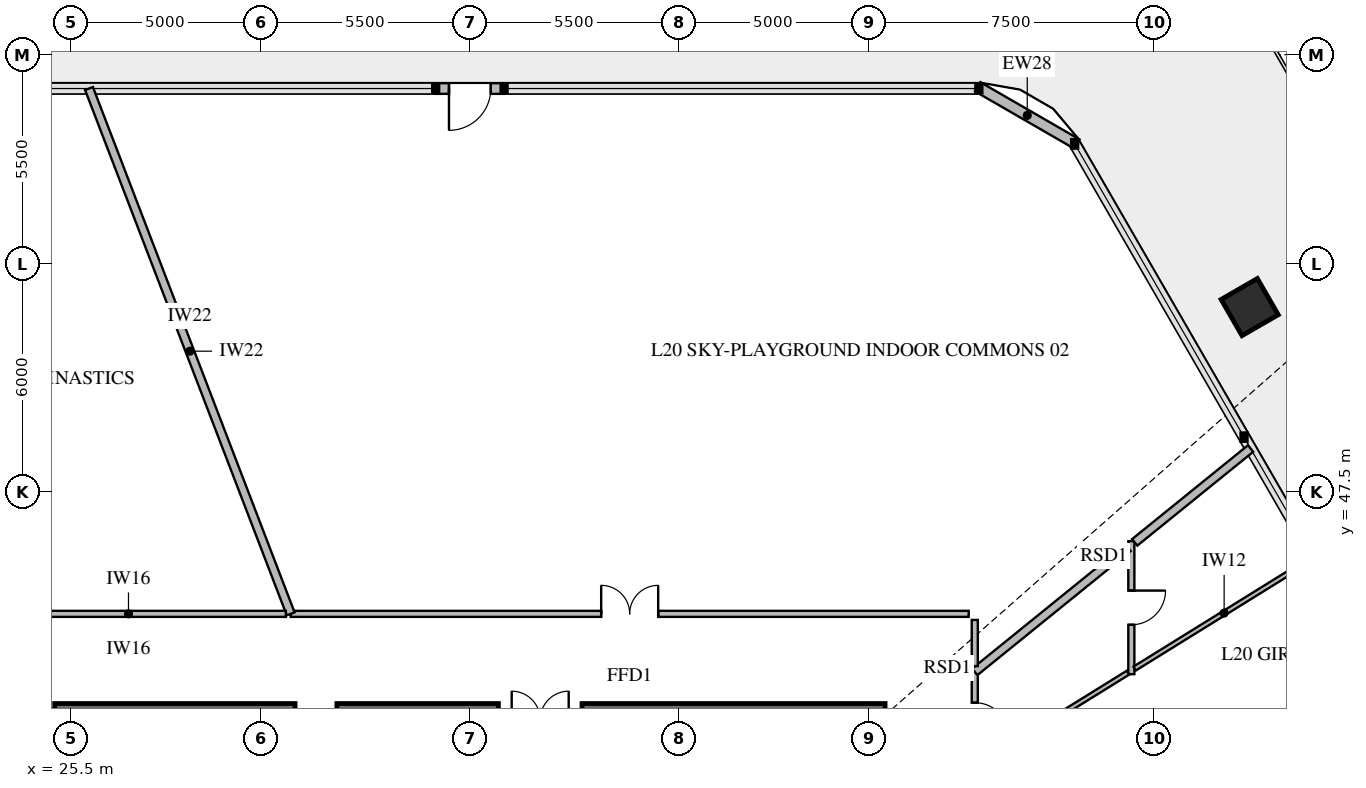
"""IFC4 building model, lengths in metres.
Left out: names, types, materials, properties, quantities, classifications, styles, units other than length and angle.
Written with IfcOpenShell. Run it as: python <this file> out.ifc"""

import sys

from ifc_helpers import new_model, si_unit, direction, frame, frame_2d, origin, origin_2d, place, context, subcontext, project, spatial, rectangle, extrude, element, fill, save


model = new_model("IFC4")
c1 = context("Model", 3, precision=1e-05, world=origin(), true_north=direction((0.0, 1.0)))
c2 = subcontext(c1, "Body", "Model", "MODEL_VIEW")
j1 = project(units=[si_unit("LENGTHUNIT", "METRE"), si_unit("PLANEANGLEUNIT", "RADIAN")], contexts=[c1])
p1 = place(None, origin())
s1 = spatial("IfcSite", under=j1, at=p1, CompositionType="ELEMENT")
p2 = place(p1, origin())
s2 = spatial("IfcBuilding", under=s1, at=p2, CompositionType="ELEMENT")
p3 = place(p2, frame((0.0, 0.0, 83.4)))
s3 = spatial("IfcBuildingStorey", under=s2, at=p3, CompositionType="ELEMENT", Elevation=83.4)
p4 = place(p3, frame((46.925, 41.5, 0.0), z_axis=(0.0, 0.0, 1.0), x_axis=(-1.0, 0.0, 0.0)))
e1 = element("IfcWall", 1, at=p4, inside=s3, PredefinedType="SHEAR", context=c2, shape_type="SweptSolid", body=[
    extrude(rectangle(XDim=7.975, YDim=0.85, at=frame_2d((3.988, 0.0))), origin(), (0.0, 0.0, 1.0), 4.2),
])
p5 = place(p3, frame((36.75, 41.5, 0.0), z_axis=(0.0, 0.0, 1.0), x_axis=(-1.0, 0.0, 0.0)))
e2 = element("IfcWall", 2, at=p5, inside=s3, PredefinedType="SHEAR", context=c2, shape_type="SweptSolid", body=[
    extrude(rectangle(XDim=11.675, YDim=0.85, at=frame_2d((5.837, 0.0))), origin(), (0.0, 0.0, 1.0), 4.2),
])
p6 = place(p5, frame((4.25, 0.0, 0.0)))
e3 = element("IfcOpeningElement", 3, at=p6, cuts=e2, PredefinedType="OPENING", context=c2, shape_type="SweptSolid", body=[
    extrude(rectangle(XDim=1.1, YDim=2.15, at=frame_2d((0.55, 1.075))), frame((0.0, 0.437, 0.0), z_axis=(0.0, -1.0, 0.0), x_axis=(1.0, 0.0, 0.0)), (0.0, 0.0, 1.0), 0.874),
])
p7 = place(p3, frame((56.519, 52.357, 0.0), z_axis=(0.0, 0.0, 1.0), x_axis=(-0.5, 0.866025403784, 0.0)))
e4 = element("IfcColumn", 4, at=p7, inside=s3, PredefinedType="COLUMN", context=c2, shape_type="SweptSolid", body=[
    extrude(rectangle(XDim=1.1, YDim=1.1, at=origin_2d()), origin(), (0.0, 0.0, 1.0), 3.85),
])
p8 = place(p3, frame((35.105, 58.108, 0.0), z_axis=(0.0, 0.0, 1.0), x_axis=(1.0, 0.0, 0.0)))
e5 = element("IfcWall", 5, at=p8, inside=s3, PredefinedType="SOLIDWALL", context=c2, shape_type="SweptSolid", body=[
    extrude(rectangle(XDim=1.79, YDim=0.28, at=frame_2d((0.895, 0.0))), origin(), (0.0, 0.0, 1.0), 3.85),
])
p9 = place(p8, frame((0.345, 0.0, 0.0)))
e6 = element("IfcOpeningElement", 6, at=p9, cuts=e5, PredefinedType="OPENING", context=c2, shape_type="SweptSolid", body=[
    extrude(rectangle(XDim=1.1, YDim=2.2, at=frame_2d((0.55, 1.1))), frame((0.0, 0.152, 0.0), z_axis=(0.0, -1.0, 0.0), x_axis=(1.0, 0.0, 0.0)), (0.0, 0.0, 1.0), 0.304),
])
p10 = place(p3, frame((49.36, 58.156, 0.0), z_axis=(0.0, 0.0, 1.0), x_axis=(0.866017028182, -0.500014506688, 0.0)))
e7 = element("IfcWall", 7, at=p10, inside=s3, PredefinedType="SOLIDWALL", context=c2, shape_type="SweptSolid", body=[
    extrude(rectangle(XDim=3.015, YDim=0.28, at=frame_2d((1.508, 0.0))), origin(), (0.0, 0.0, 1.0), 3.85),
])
p11 = place(p3, frame((53.405, 46.197, 0.0), z_axis=(0.0, 0.0, 1.0), x_axis=(0.0, -1.0, 0.0)))
e8 = element("IfcWall", 8, at=p11, inside=s3, PredefinedType="PARTITIONING", context=c2, shape_type="SweptSolid", body=[
    extrude(rectangle(XDim=3.5, YDim=0.16, at=frame_2d((1.75, 0.0))), origin(), (0.0, 0.0, 1.0), 3.4),
])
p12 = place(p11, frame((1.3, 0.0, 0.0)))
e9 = element("IfcOpeningElement", 9, at=p12, cuts=e8, PredefinedType="OPENING", context=c2, shape_type="SweptSolid", body=[
    extrude(rectangle(XDim=0.9, YDim=2.1, at=frame_2d((0.45, 1.05))), frame((0.0, 0.092, 0.0), z_axis=(0.0, -1.0, 0.0), x_axis=(1.0, 0.0, 0.0)), (0.0, 0.0, 1.0), 0.184),
])
p13 = place(p3, frame((49.285, 40.237, 0.0), z_axis=(0.0, 0.0, 1.0), x_axis=(0.0, 1.0, 0.0)))
e10 = element("IfcWall", 10, at=p13, inside=s3, PredefinedType="PARTITIONING", context=c2, shape_type="SweptSolid", body=[
    extrude(rectangle(XDim=2.521, YDim=0.16, at=frame_2d((1.26, 0.0))), origin(), (0.0, 0.0, 1.0), 3.85),
])
p14 = place(p13, frame((0.811, 0.0, 0.0)))
e11 = element("IfcOpeningElement", 11, at=p14, cuts=e10, PredefinedType="OPENING", context=c2, shape_type="SweptSolid", body=[
    extrude(rectangle(XDim=0.9, YDim=2.1, at=frame_2d((0.45, 1.05))), frame((0.0, 0.092, 0.0), z_axis=(0.0, -1.0, 0.0), x_axis=(1.0, 0.0, 0.0)), (0.0, 0.0, 1.0), 0.184),
])
p15 = place(p3, frame((49.125, 44.285, 0.0), z_axis=(0.0, 0.0, 1.0), x_axis=(-1.0, 0.0, 0.0)))
e12 = element("IfcWall", 12, at=p15, inside=s3, PredefinedType="PARTITIONING", context=c2, shape_type="SweptSolid", body=[
    extrude(rectangle(XDim=17.841, YDim=0.16, at=frame_2d((8.92, 0.0))), origin(), (0.0, 0.0, 1.0), 3.15),
])
p16 = place(p15, frame((8.17, 0.0, 0.0)))
e13 = element("IfcOpeningElement", 13, at=p16, cuts=e12, PredefinedType="OPENING", context=c2, shape_type="SweptSolid", body=[
    extrude(rectangle(XDim=1.5, YDim=2.15, at=frame_2d((0.75, 1.075))), frame((0.0, 0.092, 0.0), z_axis=(0.0, -1.0, 0.0), x_axis=(1.0, 0.0, 0.0)), (0.0, 0.0, 1.0), 0.184),
])
p17 = place(p3, frame((49.373, 37.787, 0.0), z_axis=(0.0, 0.0, 1.0), x_axis=(0.917761357583, 0.397132333772, 0.0)))
e14 = element("IfcWall", 14, at=p17, inside=s3, PredefinedType="PARTITIONING", context=c2, shape_type="SweptSolid", body=[
    extrude(rectangle(XDim=11.711, YDim=0.12, at=frame_2d((5.855, 0.0))), origin(), (0.0, 0.0, 1.0), 3.4),
])
p18 = place(p3, frame((49.373, 40.292, 0.0), z_axis=(0.0, 0.0, 1.0), x_axis=(0.849866876435, 0.526997431054, 0.0)))
e15 = element("IfcWall", 15, at=p18, inside=s3, PredefinedType="PARTITIONING", context=c2, shape_type="SweptSolid", body=[
    extrude(rectangle(XDim=4.641, YDim=0.12, at=frame_2d((2.32, 0.0))), origin(), (0.0, 0.0, 1.0), 3.85),
])
p19 = place(p3, frame((53.493, 42.846, 0.0), z_axis=(0.0, 0.0, 1.0), x_axis=(0.849887293627, 0.526964503673, 0.0)))
e16 = element("IfcWall", 16, at=p19, inside=s3, PredefinedType="PARTITIONING", context=c2, shape_type="SweptSolid", body=[
    extrude(rectangle(XDim=5.539, YDim=0.12, at=frame_2d((2.77, 0.0))), origin(), (0.0, 0.0, 1.0), 3.4),
])
p20 = place(p3, frame((49.285, 42.758, 0.0), z_axis=(0.0, 0.0, 1.0), x_axis=(0.777159385962, 0.629303812805, 0.0)))
e17 = element("IfcWall", 17, at=p20, inside=s3, PredefinedType="PARTITIONING", context=c2, shape_type="SweptSolid", body=[
    extrude(rectangle(XDim=5.188, YDim=0.22, at=frame_2d((2.594, 0.0))), origin(), (0.0, 0.0, 1.0), 3.4),
])
p21 = place(p3, frame((53.493, 46.166, 0.0), z_axis=(0.0, 0.0, 1.0), x_axis=(0.77713476339, 0.62933421926, 0.0)))
e18 = element("IfcWall", 18, at=p21, inside=s3, PredefinedType="PARTITIONING", context=c2, shape_type="SweptSolid", body=[
    extrude(rectangle(XDim=3.925, YDim=0.22, at=frame_2d((1.962, 0.0))), origin(), (0.0, 0.0, 1.0), 3.85),
])
p22 = place(p3, frame((49.285, 42.91, 0.0), z_axis=(0.0, 0.0, 1.0), x_axis=(0.0, 1.0, 0.0)))
e19 = element("IfcWall", 19, at=p22, inside=s3, PredefinedType="PARTITIONING", context=c2, shape_type="SweptSolid", body=[
    extrude(rectangle(XDim=1.215, YDim=0.16, at=frame_2d((0.607, 0.0))), origin(), (0.0, 0.0, 1.0), 3.85),
])
p23 = place(p3, frame((31.284, 44.285, 0.0), z_axis=(0.0, 0.0, 1.0), x_axis=(-0.358376835574, 0.933577015422, 0.0)))
e20 = element("IfcWall", 20, at=p23, inside=s3, PredefinedType="PARTITIONING", context=c2, shape_type="SweptSolid", body=[
    extrude(rectangle(XDim=14.807, YDim=0.22, at=frame_2d((7.403, 0.0))), origin(), (0.0, 0.0, 1.0), 3.4),
])
p24 = place(p3, frame((31.158, 44.285, 0.0), z_axis=(0.0, 0.0, 1.0), x_axis=(-1.0, 0.0, 0.0)))
e21 = element("IfcWall", 21, at=p24, inside=s3, PredefinedType="PARTITIONING", context=c2, shape_type="SweptSolid", body=[
    extrude(rectangle(XDim=8.283, YDim=0.16, at=frame_2d((4.141, 0.0))), origin(), (0.0, 0.0, 1.0), 3.15),
])
p25 = place(p9, frame((1.1, 0.0, 0.0), z_axis=(0.0, 0.0, 1.0), x_axis=(-1.0, 0.0, 0.0)))
e22 = element("IfcDoor", 22, at=p25, inside=s3, OperationType="SINGLE_SWING_RIGHT", PredefinedType="DOOR", context=c2, shape_type="SweptSolid", body=[
    extrude(rectangle(XDim=1.1, YDim=2.2, at=frame_2d((0.55, 1.1))), frame((0.0, 0.025, 0.0), z_axis=(0.0, -1.0, 0.0), x_axis=(1.0, 0.0, 0.0)), (0.0, 0.0, 1.0), 0.05),
])
fill(e6, e22)
p26 = place(p12, origin())
e23 = element("IfcDoor", 23, at=p26, inside=s3, OperationType="SINGLE_SWING_LEFT", PredefinedType="DOOR", context=c2, shape_type="SweptSolid", body=[
    extrude(rectangle(XDim=0.9, YDim=2.1, at=frame_2d((0.45, 1.05))), frame((0.0, 0.025, 0.0), z_axis=(0.0, -1.0, 0.0), x_axis=(1.0, 0.0, 0.0)), (0.0, 0.0, 1.0), 0.05),
])
fill(e9, e23)
p27 = place(p14, frame((0.9, 0.0, 0.0), z_axis=(0.0, 0.0, 1.0), x_axis=(-1.0, 0.0, 0.0)))
e24 = element("IfcDoor", 24, at=p27, inside=s3, OperationType="SINGLE_SWING_RIGHT", PredefinedType="DOOR", context=c2, shape_type="SweptSolid", body=[
    extrude(rectangle(XDim=0.9, YDim=2.1, at=frame_2d((0.45, 1.05))), frame((0.0, 0.025, 0.0), z_axis=(0.0, -1.0, 0.0), x_axis=(1.0, 0.0, 0.0)), (0.0, 0.0, 1.0), 0.05),
])
fill(e11, e24)
p28 = place(p16, frame((1.5, 0.0, 0.0), z_axis=(0.0, 0.0, 1.0), x_axis=(-1.0, 0.0, 0.0)))
e25 = element("IfcDoor", 25, at=p28, inside=s3, OperationType="DOUBLE_DOOR_SINGLE_SWING", PredefinedType="DOOR", context=c2, shape_type="SweptSolid", body=[
    extrude(rectangle(XDim=1.5, YDim=2.15, at=frame_2d((0.75, 1.075))), frame((0.0, 0.025, 0.0), z_axis=(0.0, -1.0, 0.0), x_axis=(1.0, 0.0, 0.0)), (0.0, 0.0, 1.0), 0.05),
])
fill(e13, e25)
save(model, sys.argv[1])
